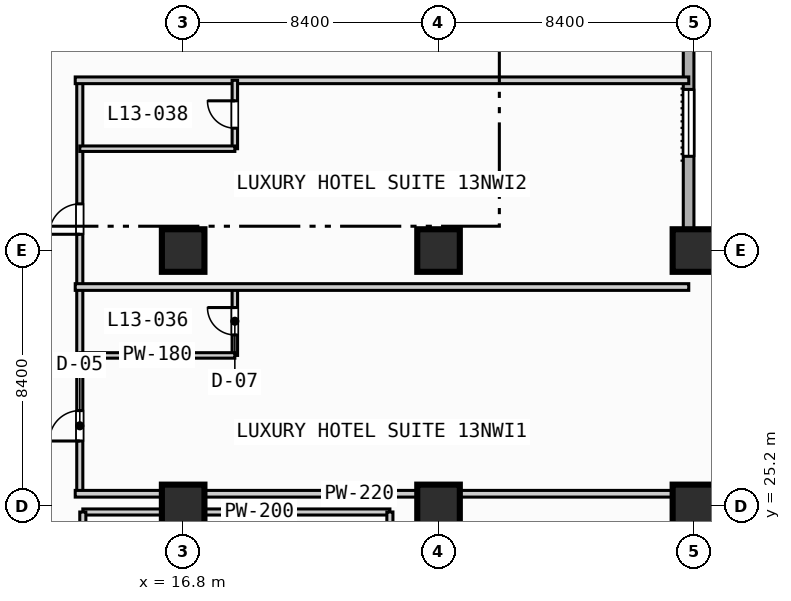
"""IFC4 building model, lengths in metres.
Left out: names, types, materials, properties, quantities, classifications, styles, units other than length and angle.
Written with IfcOpenShell. Run it as: python <this file> out.ifc"""

import sys

from ifc_helpers import new_model, si_unit, direction, frame, frame_2d, origin, origin_2d, place, context, subcontext, project, spatial, rectangle, extrude, element, fill, save


model = new_model("IFC4")
c1 = context("Model", 3, precision=1e-05, world=origin(), true_north=direction((0.0, 1.0)))
c2 = subcontext(c1, "Body", "Model", "MODEL_VIEW")
j1 = project(units=[si_unit("LENGTHUNIT", "METRE"), si_unit("PLANEANGLEUNIT", "RADIAN")], contexts=[c1])
p1 = place(None, origin())
s1 = spatial("IfcSite", under=j1, at=p1, CompositionType="ELEMENT")
p2 = place(p1, origin())
s2 = spatial("IfcBuilding", under=s1, at=p2, CompositionType="ELEMENT")
p3 = place(p2, frame((0.0, 0.0, 58.6)))
s3 = spatial("IfcBuildingStorey", under=s2, at=p3, CompositionType="ELEMENT", Elevation=58.6)
for number, where, z_axis, x_axis in (
    (1, (16.8, 25.2, 0.0), (0.0, 0.0, 1.0), (1.0, 0.0, 0.0)),
    (2, (16.8, 33.6, 0.0), (0.0, 0.0, 1.0), (1.0, 0.0, 0.0)),
    (3, (25.2, 25.2, 0.0), (0.0, 0.0, 1.0), (1.0, 0.0, 0.0)),
    (4, (25.2, 33.6, 0.0), (0.0, 0.0, 1.0), (1.0, 0.0, 0.0)),
    (5, (33.6, 25.2, 0.0), (0.0, 0.0, 1.0), (1.0, 0.0, 0.0)),
    (6, (33.6, 33.6, 0.0), (0.0, 0.0, 1.0), (1.0, 0.0, 0.0)),
):
    element("IfcColumn", number, at=place(p3, frame(where, z_axis=z_axis, x_axis=x_axis)), inside=s3, PredefinedType="COLUMN", context=c2, shape_type="SweptSolid", body=[
        extrude(rectangle(XDim=1.4, YDim=1.4, at=origin_2d()), origin(), (0.0, 0.0, 1.0), 3.8),
    ])
p4 = place(p3, frame((33.425, 89.225, 0.0), z_axis=(0.0, 0.0, 1.0), x_axis=(0.0, -1.0, 0.0)))
e7 = element("IfcWall", 7, at=p4, inside=s3, PredefinedType="STANDARD", context=c2, shape_type="SweptSolid", body=[
    extrude(rectangle(XDim=55.8, YDim=0.35, at=frame_2d((27.9, 0.0))), origin(), (0.0, 0.0, 1.0), 3.55),
])
p5 = place(p4, frame((50.325, 0.0, 0.85)))
e8 = element("IfcOpeningElement", 8, at=p5, cuts=e7, PredefinedType="OPENING", context=c2, shape_type="SweptSolid", body=[
    extrude(rectangle(XDim=2.2, YDim=1.8, at=frame_2d((1.1, 0.9))), frame((0.0, 0.185, 0.0), z_axis=(0.0, -1.0, 0.0), x_axis=(1.0, 0.0, 0.0)), (0.0, 0.0, 1.0), 0.37),
])
p6 = place(p3, frame((33.425, 33.425, 0.0), z_axis=(0.0, 0.0, 1.0), x_axis=(1.0, 0.0, 0.0)))
e9 = element("IfcWall", 9, at=p6, inside=s3, PredefinedType="STANDARD", context=c2, shape_type="SweptSolid", body=[
    extrude(rectangle(XDim=55.8, YDim=0.35, at=frame_2d((27.9, 0.0))), origin(), (0.0, 0.0, 1.0), 3.55),
])
p7 = place(p6, frame((12.075, 0.0, 0.0)))
e10 = element("IfcOpeningElement", 10, at=p7, cuts=e9, PredefinedType="OPENING", context=c2, shape_type="SweptSolid", body=[
    extrude(rectangle(XDim=1.4, YDim=2.2, at=frame_2d((0.7, 1.1))), frame((0.0, 0.185, 0.0), z_axis=(0.0, -1.0, 0.0), x_axis=(1.0, 0.0, 0.0)), (0.0, 0.0, 1.0), 0.37),
])
p8 = place(p6, frame((36.875, 0.0, 0.85)))
e11 = element("IfcOpeningElement", 11, at=p8, cuts=e9, PredefinedType="OPENING", context=c2, shape_type="SweptSolid", body=[
    extrude(rectangle(XDim=2.2, YDim=1.8, at=frame_2d((1.1, 0.9))), frame((0.0, 0.185, 0.0), z_axis=(0.0, -1.0, 0.0), x_axis=(1.0, 0.0, 0.0)), (0.0, 0.0, 1.0), 0.37),
])
p9 = place(p6, frame((45.275, 0.0, 0.85)))
e12 = element("IfcOpeningElement", 12, at=p9, cuts=e9, PredefinedType="OPENING", context=c2, shape_type="SweptSolid", body=[
    extrude(rectangle(XDim=2.2, YDim=1.8, at=frame_2d((1.1, 0.9))), frame((0.0, 0.185, 0.0), z_axis=(0.0, -1.0, 0.0), x_axis=(1.0, 0.0, 0.0)), (0.0, 0.0, 1.0), 0.37),
])
p10 = place(p3, frame((18.7, 13.65, 0.0), z_axis=(0.0, 0.0, 1.0), x_axis=(0.0, 1.0, 0.0)))
e13 = element("IfcWall", 13, at=p10, inside=s3, PredefinedType="PARTITIONING", context=c2, shape_type="SweptSolid", body=[
    extrude(rectangle(XDim=11.35, YDim=0.16, at=frame_2d((5.675, 0.0))), origin(), (0.0, 0.0, 1.0), 3.55),
])
p11 = place(p3, frame((13.5, 25.0, 0.0), z_axis=(0.0, 0.0, 1.0), x_axis=(1.0, 0.0, 0.0)))
e14 = element("IfcWall", 14, at=p11, inside=s3, PredefinedType="PARTITIONING", context=c2, shape_type="SweptSolid", body=[
    extrude(rectangle(XDim=10.1, YDim=0.2, at=frame_2d((5.05, 0.0))), origin(), (0.0, 0.0, 1.0), 2.8),
])
for number, where, z_axis, x_axis in (
    (15, (13.5, 13.65, 0.0), (0.0, 0.0, 1.0), (0.0, 1.0, 0.0)),
    (16, (23.6, 13.65, 0.0), (0.0, 0.0, 1.0), (0.0, 1.0, 0.0)),
):
    element("IfcWall", number, at=place(p3, frame(where, z_axis=z_axis, x_axis=x_axis)), inside=s3, PredefinedType="PARTITIONING", context=c2, shape_type="SweptSolid", body=[
        extrude(rectangle(XDim=11.35, YDim=0.2, at=frame_2d((5.675, 0.0))), origin(), (0.0, 0.0, 1.0), 3.55),
    ])
p12 = place(p3, frame((13.4, 25.6, 0.0), z_axis=(0.0, 0.0, 1.0), x_axis=(0.0, 1.0, 0.0)))
e17 = element("IfcWall", 17, at=p12, inside=s3, PredefinedType="PARTITIONING", context=c2, shape_type="SweptSolid", body=[
    extrude(rectangle(XDim=13.6, YDim=0.2, at=frame_2d((6.8, 0.0))), origin(), (0.0, 0.0, 1.0), 3.55),
])
p13 = place(p12, frame((1.735, 0.0, 0.0)))
e18 = element("IfcOpeningElement", 18, at=p13, cuts=e17, PredefinedType="OPENING", context=c2, shape_type="SweptSolid", body=[
    extrude(rectangle(XDim=1.0, YDim=2.15, at=frame_2d((0.5, 1.075))), frame((0.0, 0.11, 0.0), z_axis=(0.0, -1.0, 0.0), x_axis=(1.0, 0.0, 0.0)), (0.0, 0.0, 1.0), 0.22),
])
p14 = place(p12, frame((8.535, 0.0, 0.0)))
e19 = element("IfcOpeningElement", 19, at=p14, cuts=e17, PredefinedType="OPENING", context=c2, shape_type="SweptSolid", body=[
    extrude(rectangle(XDim=1.0, YDim=2.15, at=frame_2d((0.5, 1.075))), frame((0.0, 0.11, 0.0), z_axis=(0.0, -1.0, 0.0), x_axis=(1.0, 0.0, 0.0)), (0.0, 0.0, 1.0), 0.22),
])
p15 = place(p3, frame((13.25, 25.6, 0.0), z_axis=(0.0, 0.0, 1.0), x_axis=(1.0, 0.0, 0.0)))
e20 = element("IfcWall", 20, at=p15, inside=s3, PredefinedType="PARTITIONING", context=c2, shape_type="SweptSolid", body=[
    extrude(rectangle(XDim=20.18, YDim=0.22, at=frame_2d((10.09, 0.0))), origin(), (0.0, 0.0, 1.0), 3.55),
])
p16 = place(p3, frame((18.5, 30.15, 0.0), z_axis=(0.0, 0.0, 1.0), x_axis=(0.0, 1.0, 0.0)))
e21 = element("IfcWall", 21, at=p16, inside=s3, PredefinedType="PLUMBINGWALL", context=c2, shape_type="SweptSolid", body=[
    extrude(rectangle(XDim=2.25, YDim=0.18, at=frame_2d((1.125, 0.0))), origin(), (0.0, 0.0, 1.0), 3.55),
])
p17 = place(p16, frame((0.675, 0.0, 0.0)))
e22 = element("IfcOpeningElement", 22, at=p17, cuts=e21, PredefinedType="OPENING", context=c2, shape_type="SweptSolid", body=[
    extrude(rectangle(XDim=0.9, YDim=2.1, at=frame_2d((0.45, 1.05))), frame((0.0, 0.1, 0.0), z_axis=(0.0, -1.0, 0.0), x_axis=(1.0, 0.0, 0.0)), (0.0, 0.0, 1.0), 0.2),
])
p18 = place(p3, frame((13.4, 30.15, 0.0), z_axis=(0.0, 0.0, 1.0), x_axis=(1.0, 0.0, 0.0)))
e23 = element("IfcWall", 23, at=p18, inside=s3, PredefinedType="PLUMBINGWALL", context=c2, shape_type="SweptSolid", body=[
    extrude(rectangle(XDim=5.1, YDim=0.18, at=frame_2d((2.55, 0.0))), origin(), (0.0, 0.0, 1.0), 3.55),
])
for number, where, z_axis, x_axis in (
    (24, (13.25, 32.4, 0.0), (0.0, 0.0, 1.0), (1.0, 0.0, 0.0)),
    (25, (13.25, 39.2, 0.0), (0.0, 0.0, 1.0), (1.0, 0.0, 0.0)),
):
    element("IfcWall", number, at=place(p3, frame(where, z_axis=z_axis, x_axis=x_axis)), inside=s3, PredefinedType="PARTITIONING", context=c2, shape_type="SweptSolid", body=[
        extrude(rectangle(XDim=20.18, YDim=0.22, at=frame_2d((10.09, 0.0))), origin(), (0.0, 0.0, 1.0), 3.55),
    ])
p19 = place(p3, frame((18.5, 36.95, 0.0), z_axis=(0.0, 0.0, 1.0), x_axis=(0.0, 1.0, 0.0)))
e26 = element("IfcWall", 26, at=p19, inside=s3, PredefinedType="PLUMBINGWALL", context=c2, shape_type="SweptSolid", body=[
    extrude(rectangle(XDim=2.25, YDim=0.18, at=frame_2d((1.125, 0.0))), origin(), (0.0, 0.0, 1.0), 3.55),
])
p20 = place(p19, frame((0.675, 0.0, 0.0)))
e27 = element("IfcOpeningElement", 27, at=p20, cuts=e26, PredefinedType="OPENING", context=c2, shape_type="SweptSolid", body=[
    extrude(rectangle(XDim=0.9, YDim=2.1, at=frame_2d((0.45, 1.05))), frame((0.0, 0.1, 0.0), z_axis=(0.0, -1.0, 0.0), x_axis=(1.0, 0.0, 0.0)), (0.0, 0.0, 1.0), 0.2),
])
p21 = place(p3, frame((13.4, 36.95, 0.0), z_axis=(0.0, 0.0, 1.0), x_axis=(1.0, 0.0, 0.0)))
e28 = element("IfcWall", 28, at=p21, inside=s3, PredefinedType="PLUMBINGWALL", context=c2, shape_type="SweptSolid", body=[
    extrude(rectangle(XDim=5.1, YDim=0.18, at=frame_2d((2.55, 0.0))), origin(), (0.0, 0.0, 1.0), 3.55),
])
p22 = place(p5, origin())
e29 = element("IfcWindow", 29, at=p22, inside=s3, PartitioningType="SINGLE_PANEL", PredefinedType="WINDOW", context=c2, shape_type="SweptSolid", body=[
    extrude(rectangle(XDim=2.2, YDim=1.8, at=frame_2d((1.1, 0.9))), frame((0.0, 0.03, 0.0), z_axis=(0.0, -1.0, 0.0), x_axis=(1.0, 0.0, 0.0)), (0.0, 0.0, 1.0), 0.06),
])
fill(e8, e29)
p23 = place(p13, origin())
e30 = element("IfcDoor", 30, at=p23, inside=s3, OperationType="SINGLE_SWING_LEFT", PredefinedType="DOOR", context=c2, shape_type="SweptSolid", body=[
    extrude(rectangle(XDim=1.0, YDim=2.15, at=frame_2d((0.5, 1.075))), frame((0.0, 0.025, 0.0), z_axis=(0.0, -1.0, 0.0), x_axis=(1.0, 0.0, 0.0)), (0.0, 0.0, 1.0), 0.05),
])
fill(e18, e30)
p24 = place(p14, origin())
e31 = element("IfcDoor", 31, at=p24, inside=s3, OperationType="SINGLE_SWING_LEFT", PredefinedType="DOOR", context=c2, shape_type="SweptSolid", body=[
    extrude(rectangle(XDim=1.0, YDim=2.15, at=frame_2d((0.5, 1.075))), frame((0.0, 0.025, 0.0), z_axis=(0.0, -1.0, 0.0), x_axis=(1.0, 0.0, 0.0)), (0.0, 0.0, 1.0), 0.05),
])
fill(e19, e31)
p25 = place(p17, origin())
e32 = element("IfcDoor", 32, at=p25, inside=s3, OperationType="SINGLE_SWING_RIGHT", PredefinedType="DOOR", context=c2, shape_type="SweptSolid", body=[
    extrude(rectangle(XDim=0.9, YDim=2.1, at=frame_2d((0.45, 1.05))), frame((0.0, 0.025, 0.0), z_axis=(0.0, -1.0, 0.0), x_axis=(1.0, 0.0, 0.0)), (0.0, 0.0, 1.0), 0.05),
])
fill(e22, e32)
p26 = place(p20, origin())
e33 = element("IfcDoor", 33, at=p26, inside=s3, OperationType="SINGLE_SWING_RIGHT", PredefinedType="DOOR", context=c2, shape_type="SweptSolid", body=[
    extrude(rectangle(XDim=0.9, YDim=2.1, at=frame_2d((0.45, 1.05))), frame((0.0, 0.025, 0.0), z_axis=(0.0, -1.0, 0.0), x_axis=(1.0, 0.0, 0.0)), (0.0, 0.0, 1.0), 0.05),
])
fill(e27, e33)
save(model, sys.argv[1])
